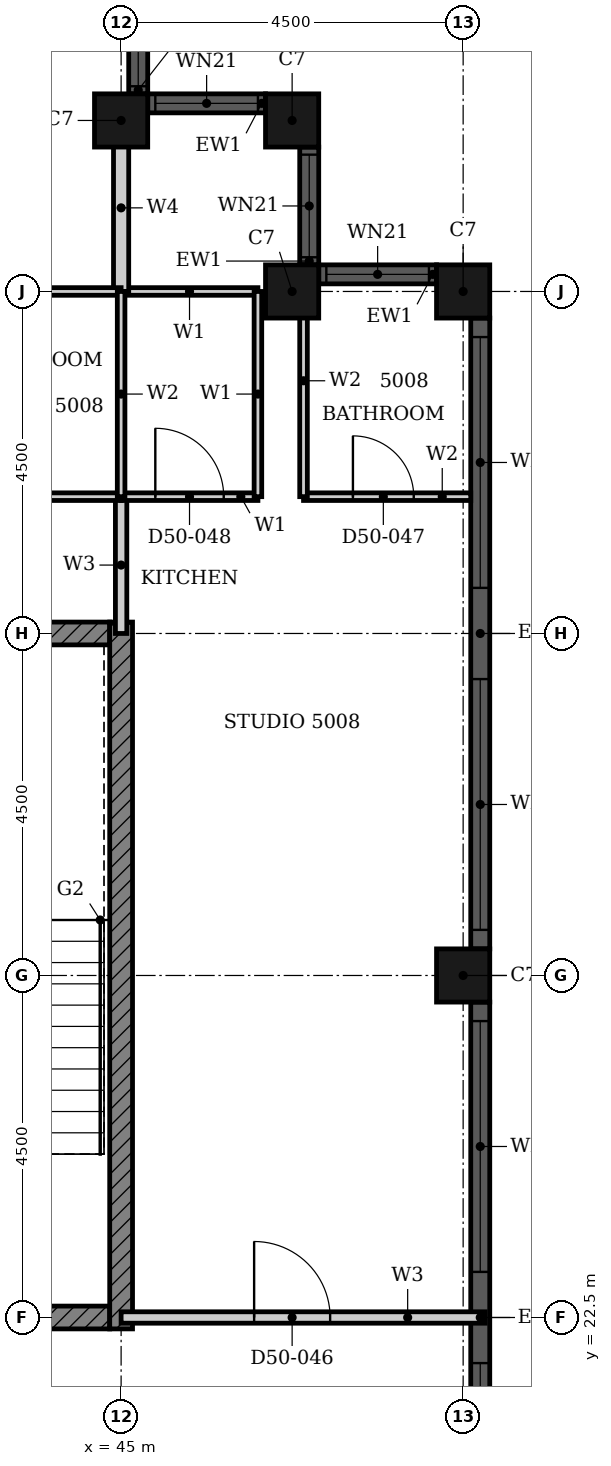
"""IFC4 building model, lengths in metres.
Left out: names, types, materials, properties, quantities, classifications, styles, units other than length and angle.
Written with IfcOpenShell. Run it as: python <this file> out.ifc"""

import sys

from ifc_helpers import new_model, si_unit, direction, frame, frame_2d, origin, origin_2d, place, context, subcontext, project, spatial, rectangle, hollow_rectangle, extrude, element, fill, save


model = new_model("IFC4")
c1 = context("Model", 3, precision=1e-05, world=origin(), true_north=direction((0.0, 1.0)))
c2 = subcontext(c1, "Body", "Model", "MODEL_VIEW")
j1 = project(units=[si_unit("LENGTHUNIT", "METRE"), si_unit("PLANEANGLEUNIT", "RADIAN")], contexts=[c1])
p1 = place(None, origin())
s1 = spatial("IfcSite", under=j1, at=p1, CompositionType="ELEMENT")
p2 = place(p1, origin())
s2 = spatial("IfcBuilding", under=s1, at=p2, CompositionType="ELEMENT")
p3 = place(p2, frame((0.0, 0.0, 199.8)))
s3 = spatial("IfcBuildingStorey", under=s2, at=p3, CompositionType="ELEMENT", Elevation=199.8)
for number, where, z_axis, x_axis in (
    (1, (49.5, 27.0, 0.0), (0.0, 0.0, 1.0), (1.0, 0.0, 0.0)),
    (2, (49.5, 36.0, 0.0), (0.0, 0.0, 1.0), (1.0, 0.0, 0.0)),
    (3, (47.25, 36.0, 0.0), (0.0, 0.0, 1.0), (1.0, 0.0, 0.0)),
    (4, (47.25, 38.25, 0.0), (0.0, 0.0, 1.0), (1.0, 0.0, 0.0)),
    (5, (45.0, 38.25, 0.0), (0.0, 0.0, 1.0), (1.0, 0.0, 0.0)),
):
    element("IfcColumn", number, at=place(p3, frame(where, z_axis=z_axis, x_axis=x_axis)), inside=s3, PredefinedType="COLUMN", context=c2, shape_type="SweptSolid", body=[
        extrude(hollow_rectangle(XDim=0.7, YDim=0.7, WallThickness=0.022, at=origin_2d()), origin(), (0.0, 0.0, 1.0), 3.7),
    ])
p4 = place(p3, frame((49.725, 18.35, 0.0), z_axis=(0.0, 0.0, 1.0), x_axis=(0.0, 1.0, 0.0)))
e6 = element("IfcWall", 6, at=p4, inside=s3, PredefinedType="SOLIDWALL", context=c2, shape_type="SweptSolid", body=[
    extrude(rectangle(XDim=8.3, YDim=0.25, at=frame_2d((4.15, 0.0))), origin(), (0.0, 0.0, 1.0), 3.7),
])
p5 = place(p4, frame((0.25, 0.0, 0.45)))
e7 = element("IfcOpeningElement", 7, at=p5, cuts=e6, PredefinedType="OPENING", context=c2, shape_type="SweptSolid", body=[
    extrude(rectangle(XDim=3.3, YDim=2.3, at=frame_2d((1.65, 1.15))), frame((0.0, 0.135, 0.0), z_axis=(0.0, -1.0, 0.0), x_axis=(1.0, 0.0, 0.0)), (0.0, 0.0, 1.0), 0.27),
])
p6 = place(p4, frame((4.75, 0.0, 0.45)))
e8 = element("IfcOpeningElement", 8, at=p6, cuts=e6, PredefinedType="OPENING", context=c2, shape_type="SweptSolid", body=[
    extrude(rectangle(XDim=3.3, YDim=2.3, at=frame_2d((1.65, 1.15))), frame((0.0, 0.135, 0.0), z_axis=(0.0, -1.0, 0.0), x_axis=(1.0, 0.0, 0.0)), (0.0, 0.0, 1.0), 0.27),
])
p7 = place(p3, frame((49.725, 27.35, 0.0), z_axis=(0.0, 0.0, 1.0), x_axis=(0.0, 1.0, 0.0)))
e9 = element("IfcWall", 9, at=p7, inside=s3, PredefinedType="SOLIDWALL", context=c2, shape_type="SweptSolid", body=[
    extrude(rectangle(XDim=8.3, YDim=0.25, at=frame_2d((4.15, 0.0))), origin(), (0.0, 0.0, 1.0), 3.7),
])
p8 = place(p7, frame((0.25, 0.0, 0.45)))
e10 = element("IfcOpeningElement", 10, at=p8, cuts=e9, PredefinedType="OPENING", context=c2, shape_type="SweptSolid", body=[
    extrude(rectangle(XDim=3.3, YDim=2.3, at=frame_2d((1.65, 1.15))), frame((0.0, 0.135, 0.0), z_axis=(0.0, -1.0, 0.0), x_axis=(1.0, 0.0, 0.0)), (0.0, 0.0, 1.0), 0.27),
])
p9 = place(p7, frame((4.75, 0.0, 0.45)))
e11 = element("IfcOpeningElement", 11, at=p9, cuts=e9, PredefinedType="OPENING", context=c2, shape_type="SweptSolid", body=[
    extrude(rectangle(XDim=3.3, YDim=2.3, at=frame_2d((1.65, 1.15))), frame((0.0, 0.135, 0.0), z_axis=(0.0, -1.0, 0.0), x_axis=(1.0, 0.0, 0.0)), (0.0, 0.0, 1.0), 0.27),
])
p10 = place(p3, frame((49.15, 36.225, 0.0), z_axis=(0.0, 0.0, 1.0), x_axis=(-1.0, 0.0, 0.0)))
e12 = element("IfcWall", 12, at=p10, inside=s3, PredefinedType="SOLIDWALL", context=c2, shape_type="SweptSolid", body=[
    extrude(rectangle(XDim=1.55, YDim=0.25, at=frame_2d((0.775, 0.0))), origin(), (0.0, 0.0, 1.0), 3.7),
])
p11 = place(p10, frame((0.1, 0.0, 0.9)))
e13 = element("IfcOpeningElement", 13, at=p11, cuts=e12, PredefinedType="OPENING", context=c2, shape_type="SweptSolid", body=[
    extrude(rectangle(XDim=1.35, YDim=1.85, at=frame_2d((0.675, 0.925))), frame((0.0, 0.135, 0.0), z_axis=(0.0, -1.0, 0.0), x_axis=(1.0, 0.0, 0.0)), (0.0, 0.0, 1.0), 0.27),
])
p12 = place(p3, frame((47.475, 36.35, 0.0), z_axis=(0.0, 0.0, 1.0), x_axis=(0.0, 1.0, 0.0)))
e14 = element("IfcWall", 14, at=p12, inside=s3, PredefinedType="SOLIDWALL", context=c2, shape_type="SweptSolid", body=[
    extrude(rectangle(XDim=1.55, YDim=0.25, at=frame_2d((0.775, 0.0))), origin(), (0.0, 0.0, 1.0), 3.7),
])
p13 = place(p12, frame((0.1, 0.0, 0.9)))
e15 = element("IfcOpeningElement", 15, at=p13, cuts=e14, PredefinedType="OPENING", context=c2, shape_type="SweptSolid", body=[
    extrude(rectangle(XDim=1.35, YDim=1.85, at=frame_2d((0.675, 0.925))), frame((0.0, 0.135, 0.0), z_axis=(0.0, -1.0, 0.0), x_axis=(1.0, 0.0, 0.0)), (0.0, 0.0, 1.0), 0.27),
])
p14 = place(p3, frame((46.9, 38.475, 0.0), z_axis=(0.0, 0.0, 1.0), x_axis=(-1.0, 0.0, 0.0)))
e16 = element("IfcWall", 16, at=p14, inside=s3, PredefinedType="SOLIDWALL", context=c2, shape_type="SweptSolid", body=[
    extrude(rectangle(XDim=1.55, YDim=0.25, at=frame_2d((0.775, 0.0))), origin(), (0.0, 0.0, 1.0), 3.7),
])
p15 = place(p14, frame((0.1, 0.0, 0.9)))
e17 = element("IfcOpeningElement", 17, at=p15, cuts=e16, PredefinedType="OPENING", context=c2, shape_type="SweptSolid", body=[
    extrude(rectangle(XDim=1.35, YDim=1.85, at=frame_2d((0.675, 0.925))), frame((0.0, 0.135, 0.0), z_axis=(0.0, -1.0, 0.0), x_axis=(1.0, 0.0, 0.0)), (0.0, 0.0, 1.0), 0.27),
])
p16 = place(p3, frame((45.225, 38.6, 0.0), z_axis=(0.0, 0.0, 1.0), x_axis=(0.0, 1.0, 0.0)))
e18 = element("IfcWall", 18, at=p16, inside=s3, PredefinedType="SOLIDWALL", context=c2, shape_type="SweptSolid", body=[
    extrude(rectangle(XDim=1.55, YDim=0.25, at=frame_2d((0.775, 0.0))), origin(), (0.0, 0.0, 1.0), 3.7),
])
p17 = place(p16, frame((0.1, 0.0, 0.9)))
e19 = element("IfcOpeningElement", 19, at=p17, cuts=e18, PredefinedType="OPENING", context=c2, shape_type="SweptSolid", body=[
    extrude(rectangle(XDim=1.35, YDim=1.85, at=frame_2d((0.675, 0.925))), frame((0.0, 0.135, 0.0), z_axis=(0.0, -1.0, 0.0), x_axis=(1.0, 0.0, 0.0)), (0.0, 0.0, 1.0), 0.27),
])
p18 = place(p3, frame((32.911, 22.5, 0.0), z_axis=(0.0, 0.0, 1.0), x_axis=(1.0, 0.0, 0.0)))
e20 = element("IfcWall", 20, at=p18, inside=s3, PredefinedType="SHEAR", context=c2, shape_type="SweptSolid", body=[
    extrude(rectangle(XDim=11.939, YDim=0.3, at=frame_2d((5.97, 0.0))), origin(), (0.0, 0.0, 1.0), 3.4),
])
p19 = place(p18, frame((5.404, 0.0, 0.0)))
e21 = element("IfcOpeningElement", 21, at=p19, cuts=e20, PredefinedType="OPENING", context=c2, shape_type="SweptSolid", body=[
    extrude(rectangle(XDim=1.8, YDim=2.1, at=frame_2d((0.9, 1.05))), frame((0.0, 0.16, 0.0), z_axis=(0.0, -1.0, 0.0), x_axis=(1.0, 0.0, 0.0)), (0.0, 0.0, 1.0), 0.32),
])
p20 = place(p3, frame((40.625, 31.5, 0.0), z_axis=(0.0, 0.0, 1.0), x_axis=(1.0, 0.0, 0.0)))
e22 = element("IfcWall", 22, at=p20, inside=s3, PredefinedType="SHEAR", context=c2, shape_type="SweptSolid", body=[
    extrude(rectangle(XDim=4.225, YDim=0.3, at=frame_2d((2.113, 0.0))), origin(), (0.0, 0.0, 1.0), 3.4),
])
p21 = place(p3, frame((45.0, 22.35, 0.0), z_axis=(0.0, 0.0, 1.0), x_axis=(0.0, 1.0, 0.0)))
e23 = element("IfcWall", 23, at=p21, inside=s3, PredefinedType="SHEAR", context=c2, shape_type="SweptSolid", body=[
    extrude(rectangle(XDim=9.3, YDim=0.3, at=frame_2d((4.65, 0.0))), origin(), (0.0, 0.0, 1.0), 3.4),
])
p22 = place(p3, frame((45.0, 22.5, 0.0), z_axis=(0.0, 0.0, 1.0), x_axis=(1.0, 0.0, 0.0)))
e24 = element("IfcWall", 24, at=p22, inside=s3, PredefinedType="PARTITIONING", context=c2, shape_type="SweptSolid", body=[
    extrude(rectangle(XDim=4.79, YDim=0.15, at=frame_2d((2.395, 0.0))), origin(), (0.0, 0.0, 1.0), 3.4),
])
p23 = place(p22, frame((1.75, 0.0, 0.0)))
e25 = element("IfcOpeningElement", 25, at=p23, cuts=e24, PredefinedType="OPENING", context=c2, shape_type="SweptSolid", body=[
    extrude(rectangle(XDim=1.0, YDim=2.2, at=frame_2d((0.5, 1.1))), frame((0.0, 0.085, 0.0), z_axis=(0.0, -1.0, 0.0), x_axis=(1.0, 0.0, 0.0)), (0.0, 0.0, 1.0), 0.17),
])
p24 = place(p3, frame((45.0, 31.5, 0.0), z_axis=(0.0, 0.0, 1.0), x_axis=(0.0, 1.0, 0.0)))
e26 = element("IfcWall", 26, at=p24, inside=s3, PredefinedType="PARTITIONING", context=c2, shape_type="SweptSolid", body=[
    extrude(rectangle(XDim=1.8, YDim=0.15, at=frame_2d((0.9, 0.0))), origin(), (0.0, 0.0, 1.0), 3.4),
])
p25 = place(p3, frame((45.0, 33.3, 0.0), z_axis=(0.0, 0.0, 1.0), x_axis=(1.0, 0.0, 0.0)))
e27 = element("IfcWall", 27, at=p25, inside=s3, PredefinedType="PARTITIONING", context=c2, shape_type="SweptSolid", body=[
    extrude(rectangle(XDim=1.8, YDim=0.1, at=frame_2d((0.9, 0.0))), origin(), (0.0, 0.0, 1.0), 3.4),
])
p26 = place(p25, frame((0.45, 0.0, 0.0)))
e28 = element("IfcOpeningElement", 28, at=p26, cuts=e27, PredefinedType="OPENING", context=c2, shape_type="SweptSolid", body=[
    extrude(rectangle(XDim=0.9, YDim=2.1, at=frame_2d((0.45, 1.05))), frame((0.0, 0.06, 0.0), z_axis=(0.0, -1.0, 0.0), x_axis=(1.0, 0.0, 0.0)), (0.0, 0.0, 1.0), 0.12),
])
p27 = place(p3, frame((45.0, 36.0, 0.0), z_axis=(0.0, 0.0, 1.0), x_axis=(1.0, 0.0, 0.0)))
e29 = element("IfcWall", 29, at=p27, inside=s3, PredefinedType="PARTITIONING", context=c2, shape_type="SweptSolid", body=[
    extrude(rectangle(XDim=1.8, YDim=0.1, at=frame_2d((0.9, 0.0))), origin(), (0.0, 0.0, 1.0), 3.4),
])
p28 = place(p3, frame((46.8, 33.3, 0.0), z_axis=(0.0, 0.0, 1.0), x_axis=(0.0, 1.0, 0.0)))
e30 = element("IfcWall", 30, at=p28, inside=s3, PredefinedType="PARTITIONING", context=c2, shape_type="SweptSolid", body=[
    extrude(rectangle(XDim=2.7, YDim=0.1, at=frame_2d((1.35, 0.0))), origin(), (0.0, 0.0, 1.0), 3.4),
])
p29 = place(p3, frame((45.0, 36.0, 0.0), z_axis=(0.0, 0.0, 1.0), x_axis=(0.0, 1.0, 0.0)))
e31 = element("IfcWall", 31, at=p29, inside=s3, PredefinedType="PARTITIONING", context=c2, shape_type="SweptSolid", body=[
    extrude(rectangle(XDim=2.2, YDim=0.2, at=frame_2d((1.1, 0.0))), origin(), (0.0, 0.0, 1.0), 3.4),
])
p30 = place(p3, frame((42.6, 33.3, 0.0), z_axis=(0.0, 0.0, 1.0), x_axis=(1.0, 0.0, 0.0)))
e32 = element("IfcWall", 32, at=p30, inside=s3, PredefinedType="PARTITIONING", context=c2, shape_type="SweptSolid", body=[
    extrude(rectangle(XDim=2.4, YDim=0.1, at=frame_2d((1.2, 0.0))), origin(), (0.0, 0.0, 1.0), 3.4),
])
p31 = place(p3, frame((47.4, 33.3, 0.0), z_axis=(0.0, 0.0, 1.0), x_axis=(1.0, 0.0, 0.0)))
e33 = element("IfcWall", 33, at=p31, inside=s3, PredefinedType="PARTITIONING", context=c2, shape_type="SweptSolid", body=[
    extrude(rectangle(XDim=2.2, YDim=0.1, at=frame_2d((1.1, 0.0))), origin(), (0.0, 0.0, 1.0), 3.4),
])
p32 = place(p31, frame((0.65, 0.0, 0.0)))
e34 = element("IfcOpeningElement", 34, at=p32, cuts=e33, PredefinedType="OPENING", context=c2, shape_type="SweptSolid", body=[
    extrude(rectangle(XDim=0.8, YDim=2.1, at=frame_2d((0.4, 1.05))), frame((0.0, 0.06, 0.0), z_axis=(0.0, -1.0, 0.0), x_axis=(1.0, 0.0, 0.0)), (0.0, 0.0, 1.0), 0.12),
])
p33 = place(p3, frame((42.6, 36.0, 0.0), z_axis=(0.0, 0.0, 1.0), x_axis=(1.0, 0.0, 0.0)))
e35 = element("IfcWall", 35, at=p33, inside=s3, PredefinedType="PARTITIONING", context=c2, shape_type="SweptSolid", body=[
    extrude(rectangle(XDim=2.4, YDim=0.1, at=frame_2d((1.2, 0.0))), origin(), (0.0, 0.0, 1.0), 3.4),
])
p34 = place(p3, frame((45.0, 33.3, 0.0), z_axis=(0.0, 0.0, 1.0), x_axis=(0.0, 1.0, 0.0)))
e36 = element("IfcWall", 36, at=p34, inside=s3, PredefinedType="PARTITIONING", context=c2, shape_type="SweptSolid", body=[
    extrude(rectangle(XDim=2.7, YDim=0.1, at=frame_2d((1.35, 0.0))), origin(), (0.0, 0.0, 1.0), 3.4),
])
p35 = place(p3, frame((47.4, 33.3, 0.0), z_axis=(0.0, 0.0, 1.0), x_axis=(0.0, 1.0, 0.0)))
e37 = element("IfcWall", 37, at=p35, inside=s3, PredefinedType="PARTITIONING", context=c2, shape_type="SweptSolid", body=[
    extrude(rectangle(XDim=3.05, YDim=0.1, at=frame_2d((1.525, 0.0))), origin(), (0.0, 0.0, 1.0), 3.4),
])
p36 = place(p5, origin())
e38 = element("IfcWindow", 38, at=p36, inside=s3, PartitioningType="SINGLE_PANEL", PredefinedType="WINDOW", context=c2, shape_type="SweptSolid", body=[
    extrude(rectangle(XDim=3.3, YDim=2.3, at=frame_2d((1.65, 1.15))), frame((0.0, 0.03, 0.0), z_axis=(0.0, -1.0, 0.0), x_axis=(1.0, 0.0, 0.0)), (0.0, 0.0, 1.0), 0.06),
])
fill(e7, e38)
p37 = place(p6, origin())
e39 = element("IfcWindow", 39, at=p37, inside=s3, PartitioningType="SINGLE_PANEL", PredefinedType="WINDOW", context=c2, shape_type="SweptSolid", body=[
    extrude(rectangle(XDim=3.3, YDim=2.3, at=frame_2d((1.65, 1.15))), frame((0.0, 0.03, 0.0), z_axis=(0.0, -1.0, 0.0), x_axis=(1.0, 0.0, 0.0)), (0.0, 0.0, 1.0), 0.06),
])
fill(e8, e39)
p38 = place(p8, origin())
e40 = element("IfcWindow", 40, at=p38, inside=s3, PartitioningType="SINGLE_PANEL", PredefinedType="WINDOW", context=c2, shape_type="SweptSolid", body=[
    extrude(rectangle(XDim=3.3, YDim=2.3, at=frame_2d((1.65, 1.15))), frame((0.0, 0.03, 0.0), z_axis=(0.0, -1.0, 0.0), x_axis=(1.0, 0.0, 0.0)), (0.0, 0.0, 1.0), 0.06),
])
fill(e10, e40)
p39 = place(p9, origin())
e41 = element("IfcWindow", 41, at=p39, inside=s3, PartitioningType="SINGLE_PANEL", PredefinedType="WINDOW", context=c2, shape_type="SweptSolid", body=[
    extrude(rectangle(XDim=3.3, YDim=2.3, at=frame_2d((1.65, 1.15))), frame((0.0, 0.03, 0.0), z_axis=(0.0, -1.0, 0.0), x_axis=(1.0, 0.0, 0.0)), (0.0, 0.0, 1.0), 0.06),
])
fill(e11, e41)
p40 = place(p11, origin())
e42 = element("IfcWindow", 42, at=p40, inside=s3, PartitioningType="SINGLE_PANEL", PredefinedType="WINDOW", context=c2, shape_type="SweptSolid", body=[
    extrude(rectangle(XDim=1.35, YDim=1.85, at=frame_2d((0.675, 0.925))), frame((0.0, 0.03, 0.0), z_axis=(0.0, -1.0, 0.0), x_axis=(1.0, 0.0, 0.0)), (0.0, 0.0, 1.0), 0.06),
])
fill(e13, e42)
p41 = place(p13, origin())
e43 = element("IfcWindow", 43, at=p41, inside=s3, PartitioningType="SINGLE_PANEL", PredefinedType="WINDOW", context=c2, shape_type="SweptSolid", body=[
    extrude(rectangle(XDim=1.35, YDim=1.85, at=frame_2d((0.675, 0.925))), frame((0.0, 0.03, 0.0), z_axis=(0.0, -1.0, 0.0), x_axis=(1.0, 0.0, 0.0)), (0.0, 0.0, 1.0), 0.06),
])
fill(e15, e43)
p42 = place(p15, origin())
e44 = element("IfcWindow", 44, at=p42, inside=s3, PartitioningType="SINGLE_PANEL", PredefinedType="WINDOW", context=c2, shape_type="SweptSolid", body=[
    extrude(rectangle(XDim=1.35, YDim=1.85, at=frame_2d((0.675, 0.925))), frame((0.0, 0.03, 0.0), z_axis=(0.0, -1.0, 0.0), x_axis=(1.0, 0.0, 0.0)), (0.0, 0.0, 1.0), 0.06),
])
fill(e17, e44)
p43 = place(p17, origin())
e45 = element("IfcWindow", 45, at=p43, inside=s3, PartitioningType="SINGLE_PANEL", PredefinedType="WINDOW", context=c2, shape_type="SweptSolid", body=[
    extrude(rectangle(XDim=1.35, YDim=1.85, at=frame_2d((0.675, 0.925))), frame((0.0, 0.03, 0.0), z_axis=(0.0, -1.0, 0.0), x_axis=(1.0, 0.0, 0.0)), (0.0, 0.0, 1.0), 0.06),
])
fill(e19, e45)
p44 = place(p23, origin())
e46 = element("IfcDoor", 46, at=p44, inside=s3, OperationType="SINGLE_SWING_RIGHT", PredefinedType="DOOR", context=c2, shape_type="SweptSolid", body=[
    extrude(rectangle(XDim=1.0, YDim=2.2, at=frame_2d((0.5, 1.1))), frame((0.0, 0.025, 0.0), z_axis=(0.0, -1.0, 0.0), x_axis=(1.0, 0.0, 0.0)), (0.0, 0.0, 1.0), 0.05),
])
fill(e25, e46)
p45 = place(p32, origin())
e47 = element("IfcDoor", 47, at=p45, inside=s3, OperationType="SINGLE_SWING_RIGHT", PredefinedType="DOOR", context=c2, shape_type="SweptSolid", body=[
    extrude(rectangle(XDim=0.8, YDim=2.1, at=frame_2d((0.4, 1.05))), frame((0.0, 0.025, 0.0), z_axis=(0.0, -1.0, 0.0), x_axis=(1.0, 0.0, 0.0)), (0.0, 0.0, 1.0), 0.05),
])
fill(e34, e47)
p46 = place(p26, origin())
e48 = element("IfcDoor", 48, at=p46, inside=s3, OperationType="SINGLE_SWING_LEFT", PredefinedType="DOOR", context=c2, shape_type="SweptSolid", body=[
    extrude(rectangle(XDim=0.9, YDim=2.1, at=frame_2d((0.45, 1.05))), frame((0.0, 0.025, 0.0), z_axis=(0.0, -1.0, 0.0), x_axis=(1.0, 0.0, 0.0)), (0.0, 0.0, 1.0), 0.05),
])
fill(e28, e48)
save(model, sys.argv[1])
